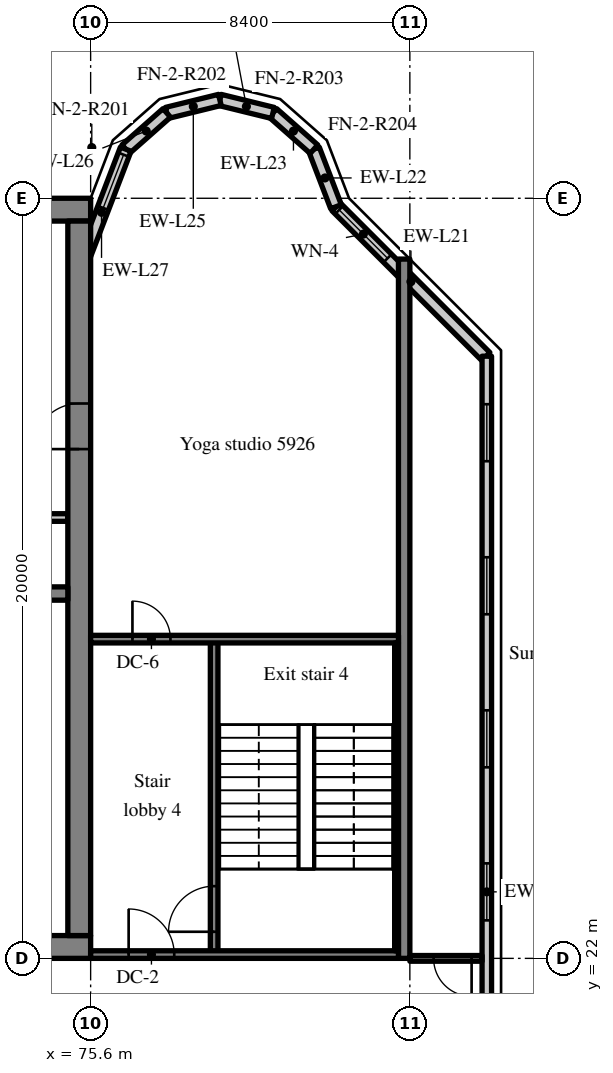
"""IFC4 building model, lengths in metres.
Left out: names, types, materials, properties, quantities, classifications, styles, units other than length and angle.
Written with IfcOpenShell. Run it as: python <this file> out.ifc"""

import sys

from ifc_helpers import new_model, si_unit, direction, frame, frame_2d, origin, place, context, subcontext, project, spatial, rectangle, extrude, source, transform, mapped, element, fill, save


model = new_model("IFC4")
c1 = context("Model", 3, precision=1e-05, world=origin(), true_north=direction((0.0, 1.0)))
c2 = subcontext(c1, "Body", "Model", "MODEL_VIEW")
j1 = project(units=[si_unit("LENGTHUNIT", "METRE"), si_unit("PLANEANGLEUNIT", "RADIAN")], contexts=[c1])
p1 = place(None, origin())
s1 = spatial("IfcSite", under=j1, at=p1, CompositionType="ELEMENT")
p2 = place(p1, origin())
s2 = spatial("IfcBuilding", under=s1, at=p2, CompositionType="ELEMENT")
p3 = place(p2, frame((0.0, 0.0, 245.2)))
s3 = spatial("IfcBuildingStorey", under=s2, at=p3, CompositionType="ELEMENT", Elevation=245.2)
m1 = source(origin(), c2, "Body", "SweptSolid", [
    extrude(rectangle(XDim=50.4, YDim=0.6, at=frame_2d((25.2, 0.0))), origin(), (0.0, 0.0, 1.0), 3.62),
])
p4 = place(p3, frame((25.2, 22.3, 0.0), z_axis=(0.0, 0.0, 1.0), x_axis=(1.0, 0.0, 0.0)))
e1 = element("IfcWall", 1, at=p4, inside=s3, PredefinedType="SHEAR", context=c2, shape_type="MappedRepresentation", body=[
    mapped(m1, transform((0.0, 0.0, 0.0), scale=1.0)),
])
m2 = source(origin(), c2, "Body", "SweptSolid", [
    extrude(rectangle(XDim=1.8, YDim=2.1, at=frame_2d((0.9, 1.05))), frame((0.0, 0.31, 0.0), z_axis=(0.0, -1.0, 0.0), x_axis=(1.0, 0.0, 0.0)), (0.0, 0.0, 1.0), 0.62),
])
p5 = place(p4, frame((15.9, 0.0, 0.0)))
e2 = element("IfcOpeningElement", 2, at=p5, cuts=e1, PredefinedType="OPENING", context=c2, shape_type="MappedRepresentation", body=[
    mapped(m2, transform((0.0, 0.0, 0.0), scale=1.0)),
])
m3 = source(origin(), c2, "Body", "SweptSolid", [
    extrude(rectangle(XDim=0.9, YDim=2.1, at=frame_2d((0.45, 1.05))), frame((0.0, 0.31, 0.0), z_axis=(0.0, -1.0, 0.0), x_axis=(1.0, 0.0, 0.0)), (0.0, 0.0, 1.0), 0.62),
])
p6 = place(p4, frame((9.687, 0.0, 0.0)))
e3 = element("IfcOpeningElement", 3, at=p6, cuts=e1, PredefinedType="OPENING", context=c2, shape_type="MappedRepresentation", body=[
    mapped(m3, transform((0.0, 0.0, 0.0), scale=1.0)),
])
p7 = place(p4, frame((21.513, 0.0, 0.0)))
e4 = element("IfcOpeningElement", 4, at=p7, cuts=e1, PredefinedType="OPENING", context=c2, shape_type="MappedRepresentation", body=[
    mapped(m3, transform((0.0, 0.0, 0.0), scale=1.0)),
])
p8 = place(p4, frame((32.7, 0.0, 0.0)))
e5 = element("IfcOpeningElement", 5, at=p8, cuts=e1, PredefinedType="OPENING", context=c2, shape_type="MappedRepresentation", body=[
    mapped(m2, transform((0.0, 0.0, 0.0), scale=1.0)),
])
m4 = source(origin(), c2, "Body", "SweptSolid", [
    extrude(rectangle(XDim=1.2, YDim=2.1, at=frame_2d((0.6, 1.05))), frame((0.0, 0.31, 0.0), z_axis=(0.0, -1.0, 0.0), x_axis=(1.0, 0.0, 0.0)), (0.0, 0.0, 1.0), 0.62),
])
p9 = place(p4, frame((6.488, 0.0, 0.0)))
e6 = element("IfcOpeningElement", 6, at=p9, cuts=e1, PredefinedType="OPENING", context=c2, shape_type="MappedRepresentation", body=[
    mapped(m4, transform((0.0, 0.0, 0.0), scale=1.0)),
])
p10 = place(p4, frame((47.925, 0.0, 0.0)))
e7 = element("IfcOpeningElement", 7, at=p10, cuts=e1, PredefinedType="OPENING", context=c2, shape_type="MappedRepresentation", body=[
    mapped(m4, transform((0.0, 0.0, 0.0), scale=1.0)),
])
p11 = place(p3, frame((25.2, 41.7, 0.0), z_axis=(0.0, 0.0, 1.0), x_axis=(1.0, 0.0, 0.0)))
e8 = element("IfcWall", 8, at=p11, inside=s3, PredefinedType="SHEAR", context=c2, shape_type="MappedRepresentation", body=[
    mapped(m1, transform((0.0, 0.0, 0.0), scale=1.0)),
])
m5 = source(origin(), c2, "Body", "SweptSolid", [
    extrude(rectangle(XDim=18.8, YDim=0.6, at=frame_2d((9.4, 0.0))), origin(), (0.0, 0.0, 1.0), 3.62),
])
p12 = place(p3, frame((75.3, 22.6, 0.0), z_axis=(0.0, 0.0, 1.0), x_axis=(0.0, 1.0, 0.0)))
e9 = element("IfcWall", 9, at=p12, inside=s3, PredefinedType="SHEAR", context=c2, shape_type="MappedRepresentation", body=[
    mapped(m5, transform((0.0, 0.0, 0.0), scale=1.0)),
])
p13 = place(p12, frame((12.8, 0.0, 0.0)))
e10 = element("IfcOpeningElement", 10, at=p13, cuts=e9, PredefinedType="OPENING", context=c2, shape_type="MappedRepresentation", body=[
    mapped(m4, transform((0.0, 0.0, 0.0), scale=1.0)),
])
m6 = source(origin(), c2, "Body", "SweptSolid", [
    extrude(rectangle(XDim=7.625, YDim=0.35, at=frame_2d((3.812, 0.0))), origin(), (0.0, 0.0, 1.0), 3.62),
])
p14 = place(p3, frame((67.375, 31.6, 0.0), z_axis=(0.0, 0.0, 1.0), x_axis=(1.0, 0.0, 0.0)))
e11 = element("IfcWall", 11, at=p14, inside=s3, PredefinedType="SHEAR", context=c2, shape_type="MappedRepresentation", body=[
    mapped(m6, transform((0.0, 0.0, 0.0), scale=1.0)),
])
m7 = source(origin(), c2, "Body", "SweptSolid", [
    extrude(rectangle(XDim=1.1, YDim=2.1, at=frame_2d((0.55, 1.05))), frame((0.0, 0.185, 0.0), z_axis=(0.0, -1.0, 0.0), x_axis=(1.0, 0.0, 0.0)), (0.0, 0.0, 1.0), 0.37),
])
p15 = place(p14, frame((5.8, 0.0, 0.0)))
e12 = element("IfcOpeningElement", 12, at=p15, cuts=e11, PredefinedType="OPENING", context=c2, shape_type="MappedRepresentation", body=[
    mapped(m7, transform((0.0, 0.0, 0.0), scale=1.0)),
])
m8 = source(origin(), c2, "Body", "SweptSolid", [
    extrude(rectangle(XDim=18.4, YDim=0.3, at=frame_2d((9.2, 0.0))), origin(), (0.0, 0.0, 1.0), 3.62),
])
p16 = place(p3, frame((83.85, 22.0, 0.0), z_axis=(0.0, 0.0, 1.0), x_axis=(0.0, 1.0, 0.0)))
e13 = element("IfcWall", 13, at=p16, inside=s3, PredefinedType="SHEAR", context=c2, shape_type="MappedRepresentation", body=[
    mapped(m8, transform((0.0, 0.0, 0.0), scale=1.0)),
])
m9 = source(origin(), c2, "Body", "SweptSolid", [
    extrude(rectangle(XDim=5.576, YDim=0.3, at=frame_2d((2.788, 0.0))), origin(), (0.0, 0.0, 1.0), 3.62),
])
p17 = place(p3, frame((86.0, 37.834, 0.0), z_axis=(0.0, 0.0, 1.0), x_axis=(-0.707106781187, 0.707106781187, 0.0)))
e14 = element("IfcWall", 14, at=p17, inside=s3, PredefinedType="SOLIDWALL", context=c2, shape_type="MappedRepresentation", body=[
    mapped(m9, transform((0.0, 0.0, 0.0), scale=1.0)),
])
m10 = source(origin(), c2, "Body", "SweptSolid", [
    extrude(rectangle(XDim=1.8, YDim=1.5, at=frame_2d((0.9, 0.75))), frame((0.0, 0.16, 0.0), z_axis=(0.0, -1.0, 0.0), x_axis=(1.0, 0.0, 0.0)), (0.0, 0.0, 1.0), 0.32),
])
p18 = place(p17, frame((3.658, 0.0, 0.9)))
e15 = element("IfcOpeningElement", 15, at=p18, cuts=e14, PredefinedType="OPENING", context=c2, shape_type="MappedRepresentation", body=[
    mapped(m10, transform((0.0, 0.0, 0.0), scale=1.0)),
])
m11 = source(origin(), c2, "Body", "SweptSolid", [
    extrude(rectangle(XDim=1.622, YDim=0.3, at=frame_2d((0.811, 0.0))), origin(), (0.0, 0.0, 1.0), 3.62),
])
p19 = place(p3, frame((82.057, 41.777, 0.0), z_axis=(0.0, 0.0, 1.0), x_axis=(-0.357778527068, 0.933806471154, 0.0)))
e16 = element("IfcWall", 16, at=p19, inside=s3, PredefinedType="SOLIDWALL", context=c2, shape_type="MappedRepresentation", body=[
    mapped(m11, transform((0.0, 0.0, 0.0), scale=1.0)),
])
m12 = source(origin(), c2, "Body", "SweptSolid", [
    extrude(rectangle(XDim=1.44, YDim=0.3, at=frame_2d((0.72, 0.0))), origin(), (0.0, 0.0, 1.0), 3.62),
])
p20 = place(p3, frame((81.477, 43.292, 0.0), z_axis=(0.0, 0.0, 1.0), x_axis=(-0.74957555648, 0.661918790432, 0.0)))
e17 = element("IfcWall", 17, at=p20, inside=s3, PredefinedType="SOLIDWALL", context=c2, shape_type="MappedRepresentation", body=[
    mapped(m12, transform((0.0, 0.0, 0.0), scale=1.0)),
])
m13 = source(origin(), c2, "Body", "SweptSolid", [
    extrude(rectangle(XDim=1.439, YDim=0.3, at=frame_2d((0.719, 0.0))), origin(), (0.0, 0.0, 1.0), 3.62),
])
for number, where, z_axis, x_axis in (
    (18, (80.397, 44.245, 0.0), (0.0, 0.0, 1.0), (-0.971, 0.238, 0.0)),
    (19, (79.0, 44.588, 0.0), (0.0, 0.0, 1.0), (-0.971, -0.238, 0.0)),
):
    element("IfcWall", number, at=place(p3, frame(where, z_axis=z_axis, x_axis=x_axis)), inside=s3, PredefinedType="SOLIDWALL", context=c2, shape_type="MappedRepresentation", body=[
        mapped(m13, transform((0.0, 0.0, 0.0), scale=1.0)),
    ])
p21 = place(p3, frame((77.603, 44.245, 0.0), z_axis=(0.0, 0.0, 1.0), x_axis=(-0.74957555648, -0.661918790432, 0.0)))
e20 = element("IfcWall", 20, at=p21, inside=s3, PredefinedType="SOLIDWALL", context=c2, shape_type="MappedRepresentation", body=[
    mapped(m12, transform((0.0, 0.0, 0.0), scale=1.0)),
])
m14 = source(origin(), c2, "Body", "SweptSolid", [
    extrude(rectangle(XDim=3.559, YDim=0.3, at=frame_2d((1.78, 0.0))), origin(), (0.0, 0.0, 1.0), 3.62),
])
p22 = place(p3, frame((76.523, 43.292, 0.0), z_axis=(0.0, 0.0, 1.0), x_axis=(-0.35779745313, -0.933799219604, 0.0)))
e21 = element("IfcWall", 21, at=p22, inside=s3, PredefinedType="SOLIDWALL", context=c2, shape_type="MappedRepresentation", body=[
    mapped(m14, transform((0.0, 0.0, 0.0), scale=1.0)),
])
m15 = source(origin(), c2, "Body", "SweptSolid", [
    extrude(rectangle(XDim=1.5, YDim=2.0, at=frame_2d((0.75, 1.0))), frame((0.0, 0.16, 0.0), z_axis=(0.0, -1.0, 0.0), x_axis=(1.0, 0.0, 0.0)), (0.0, 0.0, 1.0), 0.32),
])
p23 = place(p22, frame((0.156, 0.0, 0.9)))
e22 = element("IfcOpeningElement", 22, at=p23, cuts=e21, PredefinedType="OPENING", context=c2, shape_type="MappedRepresentation", body=[
    mapped(m15, transform((0.0, 0.0, 0.0), scale=1.0)),
])
m16 = source(origin(), c2, "Body", "SweptSolid", [
    extrude(rectangle(XDim=28.189, YDim=0.25, at=frame_2d((14.095, 0.0))), origin(), (0.0, 0.0, 1.0), 3.62),
])
p24 = place(p3, frame((86.025, 9.655, 0.0), z_axis=(0.0, 0.0, 1.0), x_axis=(0.0, 1.0, 0.0)))
e23 = element("IfcWall", 23, at=p24, inside=s3, PredefinedType="SOLIDWALL", context=c2, shape_type="MappedRepresentation", body=[
    mapped(m16, transform((0.0, 0.0, 0.0), scale=1.0)),
])
m17 = source(origin(), c2, "Body", "SweptSolid", [
    extrude(rectangle(XDim=1.5, YDim=1.5, at=frame_2d((0.75, 0.75))), frame((0.0, 0.135, 0.0), z_axis=(0.0, -1.0, 0.0), x_axis=(1.0, 0.0, 0.0)), (0.0, 0.0, 1.0), 0.27),
])
p25 = place(p24, frame((1.263, 0.0, 0.9)))
e24 = element("IfcOpeningElement", 24, at=p25, cuts=e23, PredefinedType="OPENING", context=c2, shape_type="MappedRepresentation", body=[
    mapped(m17, transform((0.0, 0.0, 0.0), scale=1.0)),
])
p26 = place(p24, frame((5.291, 0.0, 0.9)))
e25 = element("IfcOpeningElement", 25, at=p26, cuts=e23, PredefinedType="OPENING", context=c2, shape_type="MappedRepresentation", body=[
    mapped(m17, transform((0.0, 0.0, 0.0), scale=1.0)),
])
p27 = place(p24, frame((9.318, 0.0, 0.9)))
e26 = element("IfcOpeningElement", 26, at=p27, cuts=e23, PredefinedType="OPENING", context=c2, shape_type="MappedRepresentation", body=[
    mapped(m17, transform((0.0, 0.0, 0.0), scale=1.0)),
])
p28 = place(p24, frame((13.345, 0.0, 0.9)))
e27 = element("IfcOpeningElement", 27, at=p28, cuts=e23, PredefinedType="OPENING", context=c2, shape_type="MappedRepresentation", body=[
    mapped(m17, transform((0.0, 0.0, 0.0), scale=1.0)),
])
p29 = place(p24, frame((17.372, 0.0, 0.9)))
e28 = element("IfcOpeningElement", 28, at=p29, cuts=e23, PredefinedType="OPENING", context=c2, shape_type="MappedRepresentation", body=[
    mapped(m17, transform((0.0, 0.0, 0.0), scale=1.0)),
])
p30 = place(p24, frame((21.399, 0.0, 0.9)))
e29 = element("IfcOpeningElement", 29, at=p30, cuts=e23, PredefinedType="OPENING", context=c2, shape_type="MappedRepresentation", body=[
    mapped(m17, transform((0.0, 0.0, 0.0), scale=1.0)),
])
p31 = place(p24, frame((25.426, 0.0, 0.9)))
e30 = element("IfcOpeningElement", 30, at=p31, cuts=e23, PredefinedType="OPENING", context=c2, shape_type="MappedRepresentation", body=[
    mapped(m17, transform((0.0, 0.0, 0.0), scale=1.0)),
])
m18 = source(origin(), c2, "Body", "SweptSolid", [
    extrude(rectangle(XDim=2.55, YDim=0.2, at=frame_2d((1.275, 0.0))), origin(), (0.0, 0.0, 1.0), 3.62),
])
p32 = place(p3, frame((72.45, 33.6, 0.0), z_axis=(0.0, 0.0, 1.0), x_axis=(1.0, 0.0, 0.0)))
e31 = element("IfcWall", 31, at=p32, inside=s3, PredefinedType="SOLIDWALL", context=c2, shape_type="MappedRepresentation", body=[
    mapped(m18, transform((0.0, 0.0, 0.0), scale=1.0)),
])
m19 = source(origin(), c2, "Body", "SweptSolid", [
    extrude(rectangle(XDim=8.3, YDim=0.2, at=frame_2d((4.15, 0.0))), origin(), (0.0, 0.0, 1.0), 3.62),
])
p33 = place(p3, frame((78.85, 22.1, 0.0), z_axis=(0.0, 0.0, 1.0), x_axis=(0.0, 1.0, 0.0)))
e32 = element("IfcWall", 32, at=p33, inside=s3, PredefinedType="SOLIDWALL", context=c2, shape_type="MappedRepresentation", body=[
    mapped(m19, transform((0.0, 0.0, 0.0), scale=1.0)),
])
m20 = source(origin(), c2, "Body", "SweptSolid", [
    extrude(rectangle(XDim=1.2, YDim=2.1, at=frame_2d((0.6, 1.05))), frame((0.0, 0.11, 0.0), z_axis=(0.0, -1.0, 0.0), x_axis=(1.0, 0.0, 0.0)), (0.0, 0.0, 1.0), 0.22),
])
p34 = place(p33, frame((0.6, 0.0, 0.0)))
e33 = element("IfcOpeningElement", 33, at=p34, cuts=e32, PredefinedType="OPENING", context=c2, shape_type="MappedRepresentation", body=[
    mapped(m20, transform((0.0, 0.0, 0.0), scale=1.0)),
])
m21 = source(origin(), c2, "Body", "SweptSolid", [
    extrude(rectangle(XDim=8.1, YDim=0.2, at=frame_2d((4.05, 0.0))), origin(), (0.0, 0.0, 1.0), 3.62),
])
p35 = place(p3, frame((83.7, 22.1, 0.0), z_axis=(0.0, 0.0, 1.0), x_axis=(-1.0, 0.0, 0.0)))
e34 = element("IfcWall", 34, at=p35, inside=s3, PredefinedType="SOLIDWALL", context=c2, shape_type="MappedRepresentation", body=[
    mapped(m21, transform((0.0, 0.0, 0.0), scale=1.0)),
])
p36 = place(p35, frame((5.9, 0.0, 0.0)))
e35 = element("IfcOpeningElement", 35, at=p36, cuts=e34, PredefinedType="OPENING", context=c2, shape_type="MappedRepresentation", body=[
    mapped(m20, transform((0.0, 0.0, 0.0), scale=1.0)),
])
p37 = place(p3, frame((83.7, 30.4, 0.0), z_axis=(0.0, 0.0, 1.0), x_axis=(-1.0, 0.0, 0.0)))
e36 = element("IfcWall", 36, at=p37, inside=s3, PredefinedType="SOLIDWALL", context=c2, shape_type="MappedRepresentation", body=[
    mapped(m21, transform((0.0, 0.0, 0.0), scale=1.0)),
])
m22 = source(origin(), c2, "Body", "SweptSolid", [
    extrude(rectangle(XDim=1.0, YDim=2.1, at=frame_2d((0.5, 1.05))), frame((0.0, 0.11, 0.0), z_axis=(0.0, -1.0, 0.0), x_axis=(1.0, 0.0, 0.0)), (0.0, 0.0, 1.0), 0.22),
])
p38 = place(p37, frame((6.0, 0.0, 0.0)))
e37 = element("IfcOpeningElement", 37, at=p38, cuts=e36, PredefinedType="OPENING", context=c2, shape_type="MappedRepresentation", body=[
    mapped(m22, transform((0.0, 0.0, 0.0), scale=1.0)),
])
m23 = source(origin(), c2, "Body", "SweptSolid", [
    extrude(rectangle(XDim=8.1, YDim=0.1, at=frame_2d((4.05, 0.0))), origin(), (0.0, 0.0, 1.0), 3.62),
])
p39 = place(p3, frame((83.65, 22.2, 0.0), z_axis=(0.0, 0.0, 1.0), x_axis=(0.0, 1.0, 0.0)))
e38 = element("IfcWall", 38, at=p39, inside=s3, PredefinedType="SOLIDWALL", context=c2, shape_type="MappedRepresentation", body=[
    mapped(m23, transform((0.0, 0.0, 0.0), scale=1.0)),
])
m24 = source(origin(), c2, "Body", "SweptSolid", [
    extrude(rectangle(XDim=1.9, YDim=0.15, at=frame_2d((0.95, 0.0))), origin(), (0.0, 0.0, 1.0), 2.92),
])
p40 = place(p3, frame((84.0, 22.0, 0.0), z_axis=(0.0, 0.0, 1.0), x_axis=(1.0, 0.0, 0.0)))
e39 = element("IfcWall", 39, at=p40, inside=s3, PredefinedType="PARTITIONING", context=c2, shape_type="MappedRepresentation", body=[
    mapped(m24, transform((0.0, 0.0, 0.0), scale=1.0)),
])
m25 = source(origin(), c2, "Body", "SweptSolid", [
    extrude(rectangle(XDim=1.0, YDim=2.1, at=frame_2d((0.5, 1.05))), frame((0.0, 0.085, 0.0), z_axis=(0.0, -1.0, 0.0), x_axis=(1.0, 0.0, 0.0)), (0.0, 0.0, 1.0), 0.17),
])
p41 = place(p40, frame((0.625, 0.0, 0.0)))
e40 = element("IfcOpeningElement", 40, at=p41, cuts=e39, PredefinedType="OPENING", context=c2, shape_type="MappedRepresentation", body=[
    mapped(m25, transform((0.0, 0.0, 0.0), scale=1.0)),
])
m26 = source(origin(), c2, "Body", "SweptSolid", [
    extrude(rectangle(XDim=1.8, YDim=1.5, at=frame_2d((0.9, 0.75))), frame((0.0, 0.03, 0.0), z_axis=(0.0, -1.0, 0.0), x_axis=(1.0, 0.0, 0.0)), (0.0, 0.0, 1.0), 0.06),
])
p42 = place(p18, origin())
e41 = element("IfcWindow", 41, at=p42, inside=s3, PartitioningType="SINGLE_PANEL", PredefinedType="WINDOW", context=c2, shape_type="MappedRepresentation", body=[
    mapped(m26, transform((0.0, 0.0, 0.0), scale=1.0)),
])
fill(e15, e41)
m27 = source(origin(), c2, "Body", "SweptSolid", [
    extrude(rectangle(XDim=1.5, YDim=2.0, at=frame_2d((0.75, 1.0))), frame((0.0, 0.03, 0.0), z_axis=(0.0, -1.0, 0.0), x_axis=(1.0, 0.0, 0.0)), (0.0, 0.0, 1.0), 0.06),
])
p43 = place(p23, origin())
e42 = element("IfcWindow", 42, at=p43, inside=s3, PartitioningType="SINGLE_PANEL", PredefinedType="WINDOW", context=c2, shape_type="MappedRepresentation", body=[
    mapped(m27, transform((0.0, 0.0, 0.0), scale=1.0)),
])
fill(e22, e42)
m28 = source(origin(), c2, "Body", "SweptSolid", [
    extrude(rectangle(XDim=1.5, YDim=1.5, at=frame_2d((0.75, 0.75))), frame((0.0, 0.03, 0.0), z_axis=(0.0, -1.0, 0.0), x_axis=(1.0, 0.0, 0.0)), (0.0, 0.0, 1.0), 0.06),
])
p44 = place(p28, origin())
e43 = element("IfcWindow", 43, at=p44, inside=s3, PartitioningType="SINGLE_PANEL", PredefinedType="WINDOW", context=c2, shape_type="MappedRepresentation", body=[
    mapped(m28, transform((0.0, 0.0, 0.0), scale=1.0)),
])
fill(e27, e43)
p45 = place(p29, origin())
e44 = element("IfcWindow", 44, at=p45, inside=s3, PartitioningType="SINGLE_PANEL", PredefinedType="WINDOW", context=c2, shape_type="MappedRepresentation", body=[
    mapped(m28, transform((0.0, 0.0, 0.0), scale=1.0)),
])
fill(e28, e44)
p46 = place(p30, origin())
e45 = element("IfcWindow", 45, at=p46, inside=s3, PartitioningType="SINGLE_PANEL", PredefinedType="WINDOW", context=c2, shape_type="MappedRepresentation", body=[
    mapped(m28, transform((0.0, 0.0, 0.0), scale=1.0)),
])
fill(e29, e45)
p47 = place(p31, origin())
e46 = element("IfcWindow", 46, at=p47, inside=s3, PartitioningType="SINGLE_PANEL", PredefinedType="WINDOW", context=c2, shape_type="MappedRepresentation", body=[
    mapped(m28, transform((0.0, 0.0, 0.0), scale=1.0)),
])
fill(e30, e46)
m29 = source(origin(), c2, "Body", "SweptSolid", [
    extrude(rectangle(XDim=1.2, YDim=2.1, at=frame_2d((0.6, 1.05))), frame((0.0, 0.025, 0.0), z_axis=(0.0, -1.0, 0.0), x_axis=(1.0, 0.0, 0.0)), (0.0, 0.0, 1.0), 0.05),
])
p48 = place(p13, origin())
e47 = element("IfcDoor", 47, at=p48, inside=s3, OperationType="SINGLE_SWING_LEFT", PredefinedType="DOOR", context=c2, shape_type="MappedRepresentation", body=[
    mapped(m29, transform((0.0, 0.0, 0.0), scale=1.0)),
])
fill(e10, e47)
p49 = place(p34, origin())
e48 = element("IfcDoor", 48, at=p49, inside=s3, OperationType="SINGLE_SWING_LEFT", PredefinedType="DOOR", context=c2, shape_type="MappedRepresentation", body=[
    mapped(m29, transform((0.0, 0.0, 0.0), scale=1.0)),
])
fill(e33, e48)
p50 = place(p36, origin())
e49 = element("IfcDoor", 49, at=p50, inside=s3, OperationType="SINGLE_SWING_RIGHT", PredefinedType="DOOR", context=c2, shape_type="MappedRepresentation", body=[
    mapped(m29, transform((0.0, 0.0, 0.0), scale=1.0)),
])
fill(e35, e49)
m30 = source(origin(), c2, "Body", "SweptSolid", [
    extrude(rectangle(XDim=1.0, YDim=2.1, at=frame_2d((0.5, 1.05))), frame((0.0, 0.025, 0.0), z_axis=(0.0, -1.0, 0.0), x_axis=(1.0, 0.0, 0.0)), (0.0, 0.0, 1.0), 0.05),
])
p51 = place(p38, origin())
e50 = element("IfcDoor", 50, at=p51, inside=s3, OperationType="SINGLE_SWING_RIGHT", PredefinedType="DOOR", context=c2, shape_type="MappedRepresentation", body=[
    mapped(m30, transform((0.0, 0.0, 0.0), scale=1.0)),
])
fill(e37, e50)
p52 = place(p41, origin())
e51 = element("IfcDoor", 51, at=p52, inside=s3, OperationType="SINGLE_SWING_RIGHT", PredefinedType="DOOR", context=c2, shape_type="MappedRepresentation", body=[
    mapped(m30, transform((0.0, 0.0, 0.0), scale=1.0)),
])
fill(e40, e51)
save(model, sys.argv[1])
